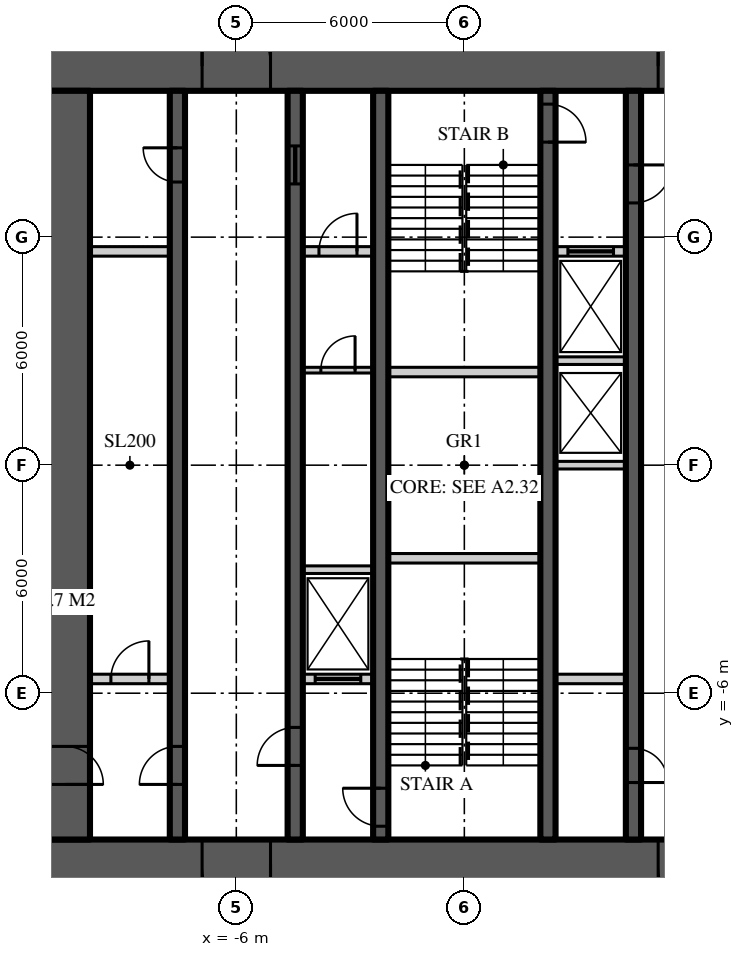
"""IFC4 building model, lengths in metres.
Left out: names, types, materials, properties, quantities, classifications, styles, units other than length and angle.
Written with IfcOpenShell. Run it as: python <this file> out.ifc"""

import sys

from ifc_helpers import new_model, si_unit, direction, frame, frame_2d, origin, place, context, subcontext, project, spatial, rectangle, extrude, element, fill, save


model = new_model("IFC4")
c1 = context("Model", 3, precision=1e-05, world=origin(), true_north=direction((0.0, 1.0)))
c2 = subcontext(c1, "Body", "Model", "MODEL_VIEW")
j1 = project(units=[si_unit("LENGTHUNIT", "METRE"), si_unit("PLANEANGLEUNIT", "RADIAN")], contexts=[c1])
p1 = place(None, origin())
s1 = spatial("IfcSite", under=j1, at=p1, CompositionType="ELEMENT")
p2 = place(p1, origin())
s2 = spatial("IfcBuilding", under=s1, at=p2, CompositionType="ELEMENT")
p3 = place(p2, frame((0.0, 0.0, 247.8)))
s3 = spatial("IfcBuildingStorey", under=s2, at=p3, CompositionType="ELEMENT", Elevation=247.8)
p4 = place(p3, frame((-11.15, 10.5, 0.0), z_axis=(0.0, 0.0, 1.0), x_axis=(1.0, 0.0, 0.0)))
e1 = element("IfcWall", 1, at=p4, inside=s3, PredefinedType="SHEAR", context=c2, shape_type="SweptSolid", body=[
    extrude(rectangle(XDim=22.3, YDim=1.3, at=frame_2d((11.15, 0.0))), origin(), (0.0, 0.0, 1.0), 3.9),
])
p5 = place(p4, frame((4.25, 0.0, 0.0)))
e2 = element("IfcOpeningElement", 2, at=p5, cuts=e1, PredefinedType="OPENING", context=c2, shape_type="SweptSolid", body=[
    extrude(rectangle(XDim=1.8, YDim=2.2, at=frame_2d((0.9, 1.1))), frame((0.0, 0.66, 0.0), z_axis=(0.0, -1.0, 0.0), x_axis=(1.0, 0.0, 0.0)), (0.0, 0.0, 1.0), 1.32),
])
p6 = place(p4, frame((16.25, 0.0, 0.0)))
e3 = element("IfcOpeningElement", 3, at=p6, cuts=e1, PredefinedType="OPENING", context=c2, shape_type="SweptSolid", body=[
    extrude(rectangle(XDim=1.8, YDim=2.2, at=frame_2d((0.9, 1.1))), frame((0.0, 0.66, 0.0), z_axis=(0.0, -1.0, 0.0), x_axis=(1.0, 0.0, 0.0)), (0.0, 0.0, 1.0), 1.32),
])
p7 = place(p3, frame((11.15, -10.5, 0.0), z_axis=(0.0, 0.0, 1.0), x_axis=(-1.0, 0.0, 0.0)))
e4 = element("IfcWall", 4, at=p7, inside=s3, PredefinedType="SHEAR", context=c2, shape_type="SweptSolid", body=[
    extrude(rectangle(XDim=22.3, YDim=1.3, at=frame_2d((11.15, 0.0))), origin(), (0.0, 0.0, 1.0), 3.9),
])
p8 = place(p7, frame((16.25, 0.0, 0.0)))
e5 = element("IfcOpeningElement", 5, at=p8, cuts=e4, PredefinedType="OPENING", context=c2, shape_type="SweptSolid", body=[
    extrude(rectangle(XDim=1.8, YDim=2.2, at=frame_2d((0.9, 1.1))), frame((0.0, 0.66, 0.0), z_axis=(0.0, -1.0, 0.0), x_axis=(1.0, 0.0, 0.0)), (0.0, 0.0, 1.0), 1.32),
])
p9 = place(p7, frame((4.25, 0.0, 0.0)))
e6 = element("IfcOpeningElement", 6, at=p9, cuts=e4, PredefinedType="OPENING", context=c2, shape_type="SweptSolid", body=[
    extrude(rectangle(XDim=1.8, YDim=2.2, at=frame_2d((0.9, 1.1))), frame((0.0, 0.66, 0.0), z_axis=(0.0, -1.0, 0.0), x_axis=(1.0, 0.0, 0.0)), (0.0, 0.0, 1.0), 1.32),
])
p10 = place(p3, frame((-10.5, 9.85, 0.0), z_axis=(0.0, 0.0, 1.0), x_axis=(0.0, -1.0, 0.0)))
e7 = element("IfcWall", 7, at=p10, inside=s3, PredefinedType="SHEAR", context=c2, shape_type="SweptSolid", body=[
    extrude(rectangle(XDim=19.7, YDim=1.3, at=frame_2d((9.85, 0.0))), origin(), (0.0, 0.0, 1.0), 3.9),
])
p11 = place(p10, frame((17.25, 0.0, 0.0)))
e8 = element("IfcOpeningElement", 8, at=p11, cuts=e7, PredefinedType="OPENING", context=c2, shape_type="SweptSolid", body=[
    extrude(rectangle(XDim=1.0, YDim=2.2, at=frame_2d((0.5, 1.1))), frame((0.0, 0.66, 0.0), z_axis=(0.0, -1.0, 0.0), x_axis=(1.0, 0.0, 0.0)), (0.0, 0.0, 1.0), 1.32),
])
p12 = place(p3, frame((-7.55, -9.85, 0.0), z_axis=(0.0, 0.0, 1.0), x_axis=(0.0, 1.0, 0.0)))
e9 = element("IfcWall", 9, at=p12, inside=s3, PredefinedType="SHEAR", context=c2, shape_type="SweptSolid", body=[
    extrude(rectangle(XDim=19.7, YDim=0.4, at=frame_2d((9.85, 0.0))), origin(), (0.0, 0.0, 1.0), 3.9),
])
p13 = place(p12, frame((1.45, 0.0, 0.0)))
e10 = element("IfcOpeningElement", 10, at=p13, cuts=e9, PredefinedType="OPENING", context=c2, shape_type="SweptSolid", body=[
    extrude(rectangle(XDim=1.0, YDim=2.2, at=frame_2d((0.5, 1.1))), frame((0.0, 0.21, 0.0), z_axis=(0.0, -1.0, 0.0), x_axis=(1.0, 0.0, 0.0)), (0.0, 0.0, 1.0), 0.42),
])
p14 = place(p12, frame((17.3, 0.0, 0.0)))
e11 = element("IfcOpeningElement", 11, at=p14, cuts=e9, PredefinedType="OPENING", context=c2, shape_type="SweptSolid", body=[
    extrude(rectangle(XDim=0.9, YDim=2.1, at=frame_2d((0.45, 1.05))), frame((0.0, 0.21, 0.0), z_axis=(0.0, -1.0, 0.0), x_axis=(1.0, 0.0, 0.0)), (0.0, 0.0, 1.0), 0.42),
])
p15 = place(p3, frame((-4.45, -9.85, 0.0), z_axis=(0.0, 0.0, 1.0), x_axis=(0.0, 1.0, 0.0)))
e12 = element("IfcWall", 12, at=p15, inside=s3, PredefinedType="SHEAR", context=c2, shape_type="SweptSolid", body=[
    extrude(rectangle(XDim=19.7, YDim=0.4, at=frame_2d((9.85, 0.0))), origin(), (0.0, 0.0, 1.0), 3.9),
])
p16 = place(p15, frame((1.95, 0.0, 0.0)))
e13 = element("IfcOpeningElement", 13, at=p16, cuts=e12, PredefinedType="OPENING", context=c2, shape_type="SweptSolid", body=[
    extrude(rectangle(XDim=1.0, YDim=2.2, at=frame_2d((0.5, 1.1))), frame((0.0, 0.21, 0.0), z_axis=(0.0, -1.0, 0.0), x_axis=(1.0, 0.0, 0.0)), (0.0, 0.0, 1.0), 0.42),
])
p17 = place(p15, frame((17.25, 0.0, 0.0)))
e14 = element("IfcOpeningElement", 14, at=p17, cuts=e12, PredefinedType="OPENING", context=c2, shape_type="SweptSolid", body=[
    extrude(rectangle(XDim=1.0, YDim=2.1, at=frame_2d((0.5, 1.05))), frame((0.0, 0.21, 0.0), z_axis=(0.0, -1.0, 0.0), x_axis=(1.0, 0.0, 0.0)), (0.0, 0.0, 1.0), 0.42),
])
p18 = place(p3, frame((4.45, 9.85, 0.0), z_axis=(0.0, 0.0, 1.0), x_axis=(0.0, -1.0, 0.0)))
e15 = element("IfcWall", 15, at=p18, inside=s3, PredefinedType="SHEAR", context=c2, shape_type="SweptSolid", body=[
    extrude(rectangle(XDim=19.7, YDim=0.4, at=frame_2d((9.85, 0.0))), origin(), (0.0, 0.0, 1.0), 3.9),
])
p19 = place(p18, frame((1.95, 0.0, 0.0)))
e16 = element("IfcOpeningElement", 16, at=p19, cuts=e15, PredefinedType="OPENING", context=c2, shape_type="SweptSolid", body=[
    extrude(rectangle(XDim=1.0, YDim=2.2, at=frame_2d((0.5, 1.1))), frame((0.0, 0.21, 0.0), z_axis=(0.0, -1.0, 0.0), x_axis=(1.0, 0.0, 0.0)), (0.0, 0.0, 1.0), 0.42),
])
p20 = place(p18, frame((17.3, 0.0, 0.0)))
e17 = element("IfcOpeningElement", 17, at=p20, cuts=e15, PredefinedType="OPENING", context=c2, shape_type="SweptSolid", body=[
    extrude(rectangle(XDim=0.9, YDim=2.1, at=frame_2d((0.45, 1.05))), frame((0.0, 0.21, 0.0), z_axis=(0.0, -1.0, 0.0), x_axis=(1.0, 0.0, 0.0)), (0.0, 0.0, 1.0), 0.42),
])
p21 = place(p3, frame((-2.2, -9.85, 0.0), z_axis=(0.0, 0.0, 1.0), x_axis=(0.0, 1.0, 0.0)))
e18 = element("IfcWall", 18, at=p21, inside=s3, PredefinedType="SHEAR", context=c2, shape_type="SweptSolid", body=[
    extrude(rectangle(XDim=19.7, YDim=0.4, at=frame_2d((9.85, 0.0))), origin(), (0.0, 0.0, 1.0), 3.9),
])
p22 = place(p21, frame((0.35, 0.0, 0.0)))
e19 = element("IfcOpeningElement", 19, at=p22, cuts=e18, PredefinedType="OPENING", context=c2, shape_type="SweptSolid", body=[
    extrude(rectangle(XDim=1.0, YDim=2.2, at=frame_2d((0.5, 1.1))), frame((0.0, 0.21, 0.0), z_axis=(0.0, -1.0, 0.0), x_axis=(1.0, 0.0, 0.0)), (0.0, 0.0, 1.0), 0.42),
])
p23 = place(p3, frame((2.2, 9.85, 0.0), z_axis=(0.0, 0.0, 1.0), x_axis=(0.0, -1.0, 0.0)))
e20 = element("IfcWall", 20, at=p23, inside=s3, PredefinedType="SHEAR", context=c2, shape_type="SweptSolid", body=[
    extrude(rectangle(XDim=19.7, YDim=0.4, at=frame_2d((9.85, 0.0))), origin(), (0.0, 0.0, 1.0), 3.9),
])
p24 = place(p23, frame((0.35, 0.0, 0.0)))
e21 = element("IfcOpeningElement", 21, at=p24, cuts=e20, PredefinedType="OPENING", context=c2, shape_type="SweptSolid", body=[
    extrude(rectangle(XDim=1.0, YDim=2.2, at=frame_2d((0.5, 1.1))), frame((0.0, 0.21, 0.0), z_axis=(0.0, -1.0, 0.0), x_axis=(1.0, 0.0, 0.0)), (0.0, 0.0, 1.0), 0.42),
])
p25 = place(p3, frame((-9.85, 5.625, 0.0), z_axis=(0.0, 0.0, 1.0), x_axis=(1.0, 0.0, 0.0)))
e22 = element("IfcWall", 22, at=p25, inside=s3, PredefinedType="SOLIDWALL", context=c2, shape_type="SweptSolid", body=[
    extrude(rectangle(XDim=2.1, YDim=0.25, at=frame_2d((1.05, 0.0))), origin(), (0.0, 0.0, 1.0), 3.7),
])
p26 = place(p3, frame((-4.25, 5.625, 0.0), z_axis=(0.0, 0.0, 1.0), x_axis=(1.0, 0.0, 0.0)))
e23 = element("IfcWall", 23, at=p26, inside=s3, PredefinedType="SOLIDWALL", context=c2, shape_type="SweptSolid", body=[
    extrude(rectangle(XDim=1.85, YDim=0.25, at=frame_2d((0.925, 0.0))), origin(), (0.0, 0.0, 1.0), 3.7),
])
p27 = place(p26, frame((0.425, 0.0, 0.0)))
e24 = element("IfcOpeningElement", 24, at=p27, cuts=e23, PredefinedType="OPENING", context=c2, shape_type="SweptSolid", body=[
    extrude(rectangle(XDim=1.0, YDim=2.2, at=frame_2d((0.5, 1.1))), frame((0.0, 0.135, 0.0), z_axis=(0.0, -1.0, 0.0), x_axis=(1.0, 0.0, 0.0)), (0.0, 0.0, 1.0), 0.27),
])
p28 = place(p3, frame((2.4, 5.625, 0.0), z_axis=(0.0, 0.0, 1.0), x_axis=(1.0, 0.0, 0.0)))
e25 = element("IfcWall", 25, at=p28, inside=s3, PredefinedType="SOLIDWALL", context=c2, shape_type="SweptSolid", body=[
    extrude(rectangle(XDim=1.85, YDim=0.25, at=frame_2d((0.925, 0.0))), origin(), (0.0, 0.0, 1.0), 3.7),
])
p29 = place(p28, frame((0.325, 0.0, 0.0)))
e26 = element("IfcOpeningElement", 26, at=p29, cuts=e25, PredefinedType="OPENING", context=c2, shape_type="SweptSolid", body=[
    extrude(rectangle(XDim=1.2, YDim=2.2, at=frame_2d((0.6, 1.1))), frame((0.0, 0.135, 0.0), z_axis=(0.0, -1.0, 0.0), x_axis=(1.0, 0.0, 0.0)), (0.0, 0.0, 1.0), 0.27),
])
p30 = place(p3, frame((-9.85, -5.625, 0.0), z_axis=(0.0, 0.0, 1.0), x_axis=(1.0, 0.0, 0.0)))
e27 = element("IfcWall", 27, at=p30, inside=s3, PredefinedType="SOLIDWALL", context=c2, shape_type="SweptSolid", body=[
    extrude(rectangle(XDim=2.1, YDim=0.25, at=frame_2d((1.05, 0.0))), origin(), (0.0, 0.0, 1.0), 3.7),
])
p31 = place(p30, frame((0.55, 0.0, 0.0)))
e28 = element("IfcOpeningElement", 28, at=p31, cuts=e27, PredefinedType="OPENING", context=c2, shape_type="SweptSolid", body=[
    extrude(rectangle(XDim=1.0, YDim=2.2, at=frame_2d((0.5, 1.1))), frame((0.0, 0.135, 0.0), z_axis=(0.0, -1.0, 0.0), x_axis=(1.0, 0.0, 0.0)), (0.0, 0.0, 1.0), 0.27),
])
p32 = place(p3, frame((-4.25, -5.625, 0.0), z_axis=(0.0, 0.0, 1.0), x_axis=(1.0, 0.0, 0.0)))
e29 = element("IfcWall", 29, at=p32, inside=s3, PredefinedType="SOLIDWALL", context=c2, shape_type="SweptSolid", body=[
    extrude(rectangle(XDim=1.85, YDim=0.25, at=frame_2d((0.925, 0.0))), origin(), (0.0, 0.0, 1.0), 3.7),
])
p33 = place(p32, frame((0.325, 0.0, 0.0)))
e30 = element("IfcOpeningElement", 30, at=p33, cuts=e29, PredefinedType="OPENING", context=c2, shape_type="SweptSolid", body=[
    extrude(rectangle(XDim=1.2, YDim=2.2, at=frame_2d((0.6, 1.1))), frame((0.0, 0.135, 0.0), z_axis=(0.0, -1.0, 0.0), x_axis=(1.0, 0.0, 0.0)), (0.0, 0.0, 1.0), 0.27),
])
p34 = place(p3, frame((2.4, -5.625, 0.0), z_axis=(0.0, 0.0, 1.0), x_axis=(1.0, 0.0, 0.0)))
e31 = element("IfcWall", 31, at=p34, inside=s3, PredefinedType="SOLIDWALL", context=c2, shape_type="SweptSolid", body=[
    extrude(rectangle(XDim=1.85, YDim=0.25, at=frame_2d((0.925, 0.0))), origin(), (0.0, 0.0, 1.0), 3.7),
])
for number, where, z_axis, x_axis in (
    (32, (-2.0, -2.45, 0.0), (0.0, 0.0, 1.0), (1.0, 0.0, 0.0)),
    (33, (-2.0, 2.45, 0.0), (0.0, 0.0, 1.0), (1.0, 0.0, 0.0)),
):
    element("IfcWall", number, at=place(p3, frame(where, z_axis=z_axis, x_axis=x_axis)), inside=s3, PredefinedType="SOLIDWALL", context=c2, shape_type="SweptSolid", body=[
        extrude(rectangle(XDim=4.0, YDim=0.25, at=frame_2d((2.0, 0.0))), origin(), (0.0, 0.0, 1.0), 3.7),
    ])
for number, where, z_axis, x_axis in (
    (34, (-4.25, -2.75, 0.0), (0.0, 0.0, 1.0), (1.0, 0.0, 0.0)),
    (35, (2.4, 0.0, 0.0), (0.0, 0.0, 1.0), (1.0, 0.0, 0.0)),
    (36, (2.4, 2.75, 0.0), (0.0, 0.0, 1.0), (1.0, 0.0, 0.0)),
):
    element("IfcWall", number, at=place(p3, frame(where, z_axis=z_axis, x_axis=x_axis)), inside=s3, PredefinedType="SOLIDWALL", context=c2, shape_type="SweptSolid", body=[
        extrude(rectangle(XDim=1.85, YDim=0.2, at=frame_2d((0.925, 0.0))), origin(), (0.0, 0.0, 1.0), 3.7),
    ])
p35 = place(p3, frame((-4.25, 2.5, 0.0), z_axis=(0.0, 0.0, 1.0), x_axis=(1.0, 0.0, 0.0)))
e37 = element("IfcWall", 37, at=p35, inside=s3, PredefinedType="SOLIDWALL", context=c2, shape_type="SweptSolid", body=[
    extrude(rectangle(XDim=1.85, YDim=0.15, at=frame_2d((0.925, 0.0))), origin(), (0.0, 0.0, 1.0), 3.77),
])
p36 = place(p35, frame((0.475, 0.0, 0.0)))
e38 = element("IfcOpeningElement", 38, at=p36, cuts=e37, PredefinedType="OPENING", context=c2, shape_type="SweptSolid", body=[
    extrude(rectangle(XDim=0.9, YDim=2.1, at=frame_2d((0.45, 1.05))), frame((0.0, 0.085, 0.0), z_axis=(0.0, -1.0, 0.0), x_axis=(1.0, 0.0, 0.0)), (0.0, 0.0, 1.0), 0.17),
])
p37 = place(p5, origin())
e39 = element("IfcDoor", 39, at=p37, inside=s3, OperationType="DOUBLE_DOOR_DOUBLE_SWING", PredefinedType="DOOR", context=c2, shape_type="SweptSolid", body=[
    extrude(rectangle(XDim=1.8, YDim=2.2, at=frame_2d((0.9, 1.1))), frame((0.0, 0.025, 0.0), z_axis=(0.0, -1.0, 0.0), x_axis=(1.0, 0.0, 0.0)), (0.0, 0.0, 1.0), 0.05),
])
fill(e2, e39)
p38 = place(p8, origin())
e40 = element("IfcDoor", 40, at=p38, inside=s3, OperationType="DOUBLE_DOOR_DOUBLE_SWING", PredefinedType="DOOR", context=c2, shape_type="SweptSolid", body=[
    extrude(rectangle(XDim=1.8, YDim=2.2, at=frame_2d((0.9, 1.1))), frame((0.0, 0.025, 0.0), z_axis=(0.0, -1.0, 0.0), x_axis=(1.0, 0.0, 0.0)), (0.0, 0.0, 1.0), 0.05),
])
fill(e5, e40)
p39 = place(p6, origin())
e41 = element("IfcDoor", 41, at=p39, inside=s3, OperationType="DOUBLE_DOOR_DOUBLE_SWING", PredefinedType="DOOR", context=c2, shape_type="SweptSolid", body=[
    extrude(rectangle(XDim=1.8, YDim=2.2, at=frame_2d((0.9, 1.1))), frame((0.0, 0.025, 0.0), z_axis=(0.0, -1.0, 0.0), x_axis=(1.0, 0.0, 0.0)), (0.0, 0.0, 1.0), 0.05),
])
fill(e3, e41)
p40 = place(p9, origin())
e42 = element("IfcDoor", 42, at=p40, inside=s3, OperationType="DOUBLE_DOOR_DOUBLE_SWING", PredefinedType="DOOR", context=c2, shape_type="SweptSolid", body=[
    extrude(rectangle(XDim=1.8, YDim=2.2, at=frame_2d((0.9, 1.1))), frame((0.0, 0.025, 0.0), z_axis=(0.0, -1.0, 0.0), x_axis=(1.0, 0.0, 0.0)), (0.0, 0.0, 1.0), 0.05),
])
fill(e6, e42)
p41 = place(p13, origin())
e43 = element("IfcDoor", 43, at=p41, inside=s3, OperationType="SINGLE_SWING_LEFT", PredefinedType="DOOR", context=c2, shape_type="SweptSolid", body=[
    extrude(rectangle(XDim=1.0, YDim=2.2, at=frame_2d((0.5, 1.1))), frame((0.0, 0.025, 0.0), z_axis=(0.0, -1.0, 0.0), x_axis=(1.0, 0.0, 0.0)), (0.0, 0.0, 1.0), 0.05),
])
fill(e10, e43)
p42 = place(p11, origin())
e44 = element("IfcDoor", 44, at=p42, inside=s3, OperationType="SINGLE_SWING_RIGHT", PredefinedType="DOOR", context=c2, shape_type="SweptSolid", body=[
    extrude(rectangle(XDim=1.0, YDim=2.2, at=frame_2d((0.5, 1.1))), frame((0.0, 0.025, 0.0), z_axis=(0.0, -1.0, 0.0), x_axis=(1.0, 0.0, 0.0)), (0.0, 0.0, 1.0), 0.05),
])
fill(e8, e44)
p43 = place(p16, origin())
e45 = element("IfcDoor", 45, at=p43, inside=s3, OperationType="SINGLE_SWING_LEFT", PredefinedType="DOOR", context=c2, shape_type="SweptSolid", body=[
    extrude(rectangle(XDim=1.0, YDim=2.2, at=frame_2d((0.5, 1.1))), frame((0.0, 0.025, 0.0), z_axis=(0.0, -1.0, 0.0), x_axis=(1.0, 0.0, 0.0)), (0.0, 0.0, 1.0), 0.05),
])
fill(e13, e45)
p44 = place(p22, origin())
e46 = element("IfcDoor", 46, at=p44, inside=s3, OperationType="SINGLE_SWING_RIGHT", PredefinedType="DOOR", context=c2, shape_type="SweptSolid", body=[
    extrude(rectangle(XDim=1.0, YDim=2.2, at=frame_2d((0.5, 1.1))), frame((0.0, 0.025, 0.0), z_axis=(0.0, -1.0, 0.0), x_axis=(1.0, 0.0, 0.0)), (0.0, 0.0, 1.0), 0.05),
])
fill(e19, e46)
p45 = place(p19, origin())
e47 = element("IfcDoor", 47, at=p45, inside=s3, OperationType="SINGLE_SWING_LEFT", PredefinedType="DOOR", context=c2, shape_type="SweptSolid", body=[
    extrude(rectangle(XDim=1.0, YDim=2.2, at=frame_2d((0.5, 1.1))), frame((0.0, 0.025, 0.0), z_axis=(0.0, -1.0, 0.0), x_axis=(1.0, 0.0, 0.0)), (0.0, 0.0, 1.0), 0.05),
])
fill(e16, e47)
p46 = place(p24, origin())
e48 = element("IfcDoor", 48, at=p46, inside=s3, OperationType="SINGLE_SWING_RIGHT", PredefinedType="DOOR", context=c2, shape_type="SweptSolid", body=[
    extrude(rectangle(XDim=1.0, YDim=2.2, at=frame_2d((0.5, 1.1))), frame((0.0, 0.025, 0.0), z_axis=(0.0, -1.0, 0.0), x_axis=(1.0, 0.0, 0.0)), (0.0, 0.0, 1.0), 0.05),
])
fill(e21, e48)
p47 = place(p14, origin())
e49 = element("IfcDoor", 49, at=p47, inside=s3, OperationType="SINGLE_SWING_RIGHT", PredefinedType="DOOR", context=c2, shape_type="SweptSolid", body=[
    extrude(rectangle(XDim=0.9, YDim=2.1, at=frame_2d((0.45, 1.05))), frame((0.0, 0.025, 0.0), z_axis=(0.0, -1.0, 0.0), x_axis=(1.0, 0.0, 0.0)), (0.0, 0.0, 1.0), 0.05),
])
fill(e11, e49)
p48 = place(p17, origin())
e50 = element("IfcDoor", 50, at=p48, inside=s3, OperationType="SLIDING_TO_LEFT", PredefinedType="DOOR", context=c2, shape_type="SweptSolid", body=[
    extrude(rectangle(XDim=1.0, YDim=2.1, at=frame_2d((0.5, 1.05))), frame((0.0, 0.025, 0.0), z_axis=(0.0, -1.0, 0.0), x_axis=(1.0, 0.0, 0.0)), (0.0, 0.0, 1.0), 0.05),
])
fill(e14, e50)
p49 = place(p20, origin())
e51 = element("IfcDoor", 51, at=p49, inside=s3, OperationType="SINGLE_SWING_RIGHT", PredefinedType="DOOR", context=c2, shape_type="SweptSolid", body=[
    extrude(rectangle(XDim=0.9, YDim=2.1, at=frame_2d((0.45, 1.05))), frame((0.0, 0.025, 0.0), z_axis=(0.0, -1.0, 0.0), x_axis=(1.0, 0.0, 0.0)), (0.0, 0.0, 1.0), 0.05),
])
fill(e17, e51)
p50 = place(p33, origin())
e52 = element("IfcDoor", 52, at=p50, inside=s3, OperationType="SLIDING_TO_LEFT", PredefinedType="DOOR", context=c2, shape_type="SweptSolid", body=[
    extrude(rectangle(XDim=1.2, YDim=2.2, at=frame_2d((0.6, 1.1))), frame((0.0, 0.025, 0.0), z_axis=(0.0, -1.0, 0.0), x_axis=(1.0, 0.0, 0.0)), (0.0, 0.0, 1.0), 0.05),
])
fill(e30, e52)
p51 = place(p29, origin())
e53 = element("IfcDoor", 53, at=p51, inside=s3, OperationType="SLIDING_TO_LEFT", PredefinedType="DOOR", context=c2, shape_type="SweptSolid", body=[
    extrude(rectangle(XDim=1.2, YDim=2.2, at=frame_2d((0.6, 1.1))), frame((0.0, 0.025, 0.0), z_axis=(0.0, -1.0, 0.0), x_axis=(1.0, 0.0, 0.0)), (0.0, 0.0, 1.0), 0.05),
])
fill(e26, e53)
p52 = place(p31, origin())
e54 = element("IfcDoor", 54, at=p52, inside=s3, OperationType="SINGLE_SWING_RIGHT", PredefinedType="DOOR", context=c2, shape_type="SweptSolid", body=[
    extrude(rectangle(XDim=1.0, YDim=2.2, at=frame_2d((0.5, 1.1))), frame((0.0, 0.025, 0.0), z_axis=(0.0, -1.0, 0.0), x_axis=(1.0, 0.0, 0.0)), (0.0, 0.0, 1.0), 0.05),
])
fill(e28, e54)
p53 = place(p36, origin())
e55 = element("IfcDoor", 55, at=p53, inside=s3, OperationType="SINGLE_SWING_RIGHT", PredefinedType="DOOR", context=c2, shape_type="SweptSolid", body=[
    extrude(rectangle(XDim=0.9, YDim=2.1, at=frame_2d((0.45, 1.05))), frame((0.0, 0.025, 0.0), z_axis=(0.0, -1.0, 0.0), x_axis=(1.0, 0.0, 0.0)), (0.0, 0.0, 1.0), 0.05),
])
fill(e38, e55)
p54 = place(p27, origin())
e56 = element("IfcDoor", 56, at=p54, inside=s3, OperationType="SINGLE_SWING_RIGHT", PredefinedType="DOOR", context=c2, shape_type="SweptSolid", body=[
    extrude(rectangle(XDim=1.0, YDim=2.2, at=frame_2d((0.5, 1.1))), frame((0.0, 0.025, 0.0), z_axis=(0.0, -1.0, 0.0), x_axis=(1.0, 0.0, 0.0)), (0.0, 0.0, 1.0), 0.05),
])
fill(e24, e56)
save(model, sys.argv[1])
